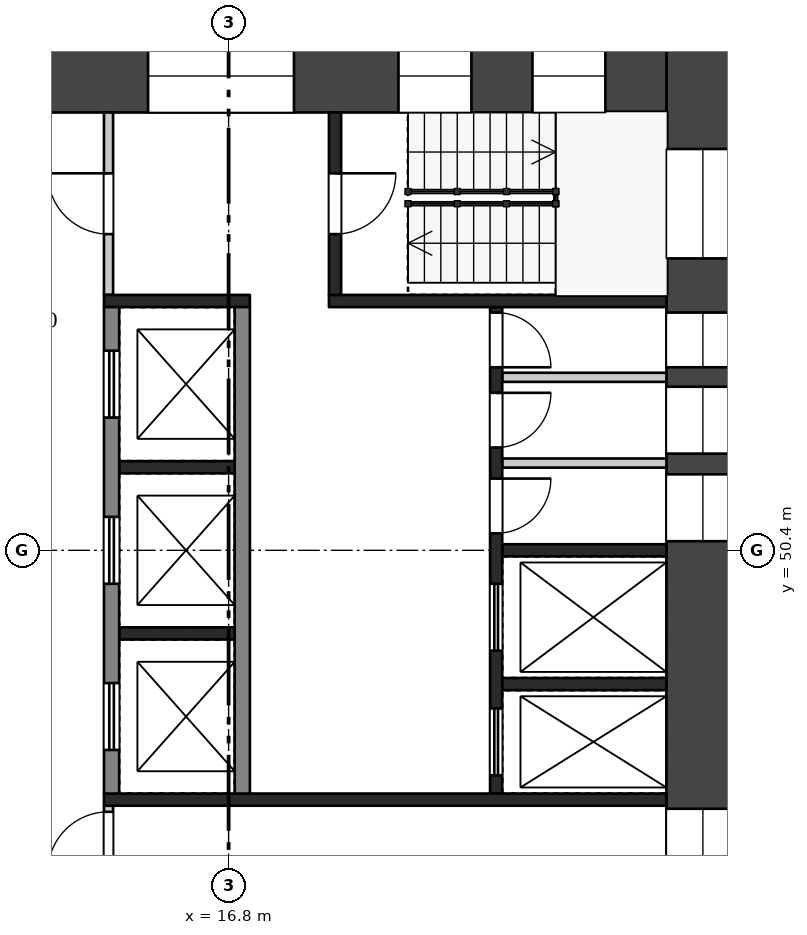
"""IFC4 building model, lengths in metres.
Left out: names, types, materials, properties, quantities, classifications, styles, units other than length and angle.
Written with IfcOpenShell. Run it as: python <this file> out.ifc"""

import sys

from ifc_helpers import new_model, si_unit, direction, frame, frame_2d, origin, place, context, subcontext, project, spatial, rectangle, extrude, element, fill, save


model = new_model("IFC4")
c1 = context("Model", 3, precision=1e-05, world=origin(), true_north=direction((0.0, 1.0)))
c2 = subcontext(c1, "Body", "Model", "MODEL_VIEW")
j1 = project(units=[si_unit("LENGTHUNIT", "METRE"), si_unit("PLANEANGLEUNIT", "RADIAN")], contexts=[c1])
p1 = place(None, origin())
s1 = spatial("IfcSite", under=j1, at=p1, CompositionType="ELEMENT")
p2 = place(p1, origin())
s2 = spatial("IfcBuilding", under=s1, at=p2, CompositionType="ELEMENT")
p3 = place(p2, frame((0.0, 0.0, 158.2)))
s3 = spatial("IfcBuildingStorey", under=s2, at=p3, CompositionType="ELEMENT", Elevation=158.2)
p4 = place(p3, frame((24.6, 58.8, 0.0), z_axis=(0.0, 0.0, 1.0), x_axis=(0.0, -1.0, 0.0)))
e1 = element("IfcWall", 1, at=p4, inside=s3, PredefinedType="SHEAR", context=c2, shape_type="SweptSolid", body=[
    extrude(rectangle(XDim=16.8, YDim=1.2, at=frame_2d((8.4, 0.0))), origin(), (0.0, 0.0, 1.0), 3.22),
])
p5 = place(p4, frame((1.8, 0.0, 0.5)))
e2 = element("IfcOpeningElement", 2, at=p5, cuts=e1, PredefinedType="OPENING", context=c2, shape_type="SweptSolid", body=[
    extrude(rectangle(XDim=1.8, YDim=2.4, at=frame_2d((0.9, 1.2))), frame((0.0, 0.61, 0.0), z_axis=(0.0, -1.0, 0.0), x_axis=(1.0, 0.0, 0.0)), (0.0, 0.0, 1.0), 1.22),
])
p6 = place(p4, frame((4.49, 0.0, 1.6)))
e3 = element("IfcOpeningElement", 3, at=p6, cuts=e1, PredefinedType="OPENING", context=c2, shape_type="SweptSolid", body=[
    extrude(rectangle(XDim=0.9, YDim=1.2, at=frame_2d((0.45, 0.6))), frame((0.0, 0.61, 0.0), z_axis=(0.0, -1.0, 0.0), x_axis=(1.0, 0.0, 0.0)), (0.0, 0.0, 1.0), 1.22),
])
p7 = place(p4, frame((5.71, 0.0, 1.6)))
e4 = element("IfcOpeningElement", 4, at=p7, cuts=e1, PredefinedType="OPENING", context=c2, shape_type="SweptSolid", body=[
    extrude(rectangle(XDim=1.1, YDim=1.2, at=frame_2d((0.55, 0.6))), frame((0.0, 0.61, 0.0), z_axis=(0.0, -1.0, 0.0), x_axis=(1.0, 0.0, 0.0)), (0.0, 0.0, 1.0), 1.22),
])
p8 = place(p4, frame((7.15, 0.0, 1.6)))
e5 = element("IfcOpeningElement", 5, at=p8, cuts=e1, PredefinedType="OPENING", context=c2, shape_type="SweptSolid", body=[
    extrude(rectangle(XDim=1.1, YDim=1.2, at=frame_2d((0.55, 0.6))), frame((0.0, 0.61, 0.0), z_axis=(0.0, -1.0, 0.0), x_axis=(1.0, 0.0, 0.0)), (0.0, 0.0, 1.0), 1.22),
])
p9 = place(p4, frame((12.65, 0.0, 0.6)))
e6 = element("IfcOpeningElement", 6, at=p9, cuts=e1, PredefinedType="OPENING", context=c2, shape_type="SweptSolid", body=[
    extrude(rectangle(XDim=1.0, YDim=2.1, at=frame_2d((0.5, 1.05))), frame((0.0, 0.61, 0.0), z_axis=(0.0, -1.0, 0.0), x_axis=(1.0, 0.0, 0.0)), (0.0, 0.0, 1.0), 1.22),
])
p10 = place(p4, frame((14.175, 0.0, 1.6)))
e7 = element("IfcOpeningElement", 7, at=p10, cuts=e1, PredefinedType="OPENING", context=c2, shape_type="SweptSolid", body=[
    extrude(rectangle(XDim=1.2, YDim=1.2, at=frame_2d((0.6, 0.6))), frame((0.0, 0.61, 0.0), z_axis=(0.0, -1.0, 0.0), x_axis=(1.0, 0.0, 0.0)), (0.0, 0.0, 1.0), 1.22),
])
p11 = place(p3, frame((9.6, 58.2, 0.0), z_axis=(0.0, 0.0, 1.0), x_axis=(1.0, 0.0, 0.0)))
e8 = element("IfcWall", 8, at=p11, inside=s3, PredefinedType="SHEAR", context=c2, shape_type="SweptSolid", body=[
    extrude(rectangle(XDim=14.4, YDim=1.2, at=frame_2d((7.2, 0.0))), origin(), (0.0, 0.0, 1.0), 3.22),
])
p12 = place(p11, frame((1.105, 0.0, 0.6)))
e9 = element("IfcOpeningElement", 9, at=p12, cuts=e8, PredefinedType="OPENING", context=c2, shape_type="SweptSolid", body=[
    extrude(rectangle(XDim=3.0, YDim=2.1, at=frame_2d((1.5, 1.05))), frame((0.0, 0.61, 0.0), z_axis=(0.0, -1.0, 0.0), x_axis=(1.0, 0.0, 0.0)), (0.0, 0.0, 1.0), 1.22),
])
p13 = place(p11, frame((5.875, 0.0, 0.6)))
e10 = element("IfcOpeningElement", 10, at=p13, cuts=e8, PredefinedType="OPENING", context=c2, shape_type="SweptSolid", body=[
    extrude(rectangle(XDim=2.4, YDim=2.1, at=frame_2d((1.2, 1.05))), frame((0.0, 0.61, 0.0), z_axis=(0.0, -1.0, 0.0), x_axis=(1.0, 0.0, 0.0)), (0.0, 0.0, 1.0), 1.22),
])
p14 = place(p11, frame((9.993, 0.0, 0.5)))
e11 = element("IfcOpeningElement", 11, at=p14, cuts=e8, PredefinedType="OPENING", context=c2, shape_type="SweptSolid", body=[
    extrude(rectangle(XDim=1.2, YDim=2.4, at=frame_2d((0.6, 1.2))), frame((0.0, 0.61, 0.0), z_axis=(0.0, -1.0, 0.0), x_axis=(1.0, 0.0, 0.0)), (0.0, 0.0, 1.0), 1.22),
])
p15 = place(p11, frame((12.197, 0.0, 0.5)))
e12 = element("IfcOpeningElement", 12, at=p15, cuts=e8, PredefinedType="OPENING", context=c2, shape_type="SweptSolid", body=[
    extrude(rectangle(XDim=1.2, YDim=2.4, at=frame_2d((0.6, 1.2))), frame((0.0, 0.61, 0.0), z_axis=(0.0, -1.0, 0.0), x_axis=(1.0, 0.0, 0.0)), (0.0, 0.0, 1.0), 1.22),
])
for number, where, z_axis, x_axis in (
    (13, (15.0, 51.767, 0.0), (0.0, 0.0, 1.0), (1.0, 0.0, 0.0)),
    (14, (15.0, 49.033, 0.0), (0.0, 0.0, 1.0), (1.0, 0.0, 0.0)),
):
    element("IfcWall", number, at=place(p3, frame(where, z_axis=z_axis, x_axis=x_axis)), inside=s3, PredefinedType="SHEAR", context=c2, shape_type="SweptSolid", body=[
        extrude(rectangle(XDim=1.9, YDim=0.2, at=frame_2d((0.95, 0.0))), origin(), (0.0, 0.0, 1.0), 3.22),
    ])
p16 = place(p3, frame((14.875, 54.4, 0.0), z_axis=(0.0, 0.0, 1.0), x_axis=(0.0, -1.0, 0.0)))
e15 = element("IfcWall", 15, at=p16, inside=s3, PredefinedType="SHEAR", context=c2, shape_type="SweptSolid", body=[
    extrude(rectangle(XDim=8.0, YDim=0.25, at=frame_2d((4.0, 0.0))), origin(), (0.0, 0.0, 1.0), 3.22),
])
p17 = place(p16, frame((0.717, 0.0, 0.0)))
e16 = element("IfcOpeningElement", 16, at=p17, cuts=e15, PredefinedType="OPENING", context=c2, shape_type="SweptSolid", body=[
    extrude(rectangle(XDim=1.1, YDim=2.1, at=frame_2d((0.55, 1.05))), frame((0.0, 0.135, 0.0), z_axis=(0.0, -1.0, 0.0), x_axis=(1.0, 0.0, 0.0)), (0.0, 0.0, 1.0), 0.27),
])
p18 = place(p16, frame((3.45, 0.0, 0.0)))
e17 = element("IfcOpeningElement", 17, at=p18, cuts=e15, PredefinedType="OPENING", context=c2, shape_type="SweptSolid", body=[
    extrude(rectangle(XDim=1.1, YDim=2.1, at=frame_2d((0.55, 1.05))), frame((0.0, 0.135, 0.0), z_axis=(0.0, -1.0, 0.0), x_axis=(1.0, 0.0, 0.0)), (0.0, 0.0, 1.0), 0.27),
])
p19 = place(p16, frame((6.183, 0.0, 0.0)))
e18 = element("IfcOpeningElement", 18, at=p19, cuts=e15, PredefinedType="OPENING", context=c2, shape_type="SweptSolid", body=[
    extrude(rectangle(XDim=1.1, YDim=2.1, at=frame_2d((0.55, 1.05))), frame((0.0, 0.135, 0.0), z_axis=(0.0, -1.0, 0.0), x_axis=(1.0, 0.0, 0.0)), (0.0, 0.0, 1.0), 0.27),
])
p20 = place(p3, frame((17.025, 54.4, 0.0), z_axis=(0.0, 0.0, 1.0), x_axis=(0.0, -1.0, 0.0)))
e19 = element("IfcWall", 19, at=p20, inside=s3, PredefinedType="SHEAR", context=c2, shape_type="SweptSolid", body=[
    extrude(rectangle(XDim=8.0, YDim=0.25, at=frame_2d((4.0, 0.0))), origin(), (0.0, 0.0, 1.0), 3.22),
])
for number, where, z_axis, x_axis in (
    (20, (21.3, 50.4, 0.0), (0.0, 0.0, 1.0), (1.0, 0.0, 0.0)),
    (21, (21.3, 48.2, 0.0), (0.0, 0.0, 1.0), (1.0, 0.0, 0.0)),
):
    element("IfcWall", number, at=place(p3, frame(where, z_axis=z_axis, x_axis=x_axis)), inside=s3, PredefinedType="SHEAR", context=c2, shape_type="SweptSolid", body=[
        extrude(rectangle(XDim=2.7, YDim=0.2, at=frame_2d((1.35, 0.0))), origin(), (0.0, 0.0, 1.0), 3.22),
    ])
for number, where, z_axis, x_axis in (
    (22, (21.3, 53.245, 0.0), (0.0, 0.0, 1.0), (1.0, 0.0, 0.0)),
    (23, (21.3, 51.835, 0.0), (0.0, 0.0, 1.0), (1.0, 0.0, 0.0)),
):
    element("IfcWall", number, at=place(p3, frame(where, z_axis=z_axis, x_axis=x_axis)), inside=s3, PredefinedType="PARTITIONING", context=c2, shape_type="SweptSolid", body=[
        extrude(rectangle(XDim=2.7, YDim=0.15, at=frame_2d((1.35, 0.0))), origin(), (0.0, 0.0, 1.0), 3.22),
    ])
p21 = place(p3, frame((21.2, 54.4, 0.0), z_axis=(0.0, 0.0, 1.0), x_axis=(0.0, -1.0, 0.0)))
e24 = element("IfcWall", 24, at=p21, inside=s3, PredefinedType="SHEAR", context=c2, shape_type="SweptSolid", body=[
    extrude(rectangle(XDim=8.0, YDim=0.2, at=frame_2d((4.0, 0.0))), origin(), (0.0, 0.0, 1.0), 3.22),
])
p22 = place(p21, frame((0.09, 0.0, 0.0)))
e25 = element("IfcOpeningElement", 25, at=p22, cuts=e24, PredefinedType="OPENING", context=c2, shape_type="SweptSolid", body=[
    extrude(rectangle(XDim=0.9, YDim=2.1, at=frame_2d((0.45, 1.05))), frame((0.0, 0.11, 0.0), z_axis=(0.0, -1.0, 0.0), x_axis=(1.0, 0.0, 0.0)), (0.0, 0.0, 1.0), 0.22),
])
p23 = place(p21, frame((1.41, 0.0, 0.0)))
e26 = element("IfcOpeningElement", 26, at=p23, cuts=e24, PredefinedType="OPENING", context=c2, shape_type="SweptSolid", body=[
    extrude(rectangle(XDim=0.9, YDim=2.1, at=frame_2d((0.45, 1.05))), frame((0.0, 0.11, 0.0), z_axis=(0.0, -1.0, 0.0), x_axis=(1.0, 0.0, 0.0)), (0.0, 0.0, 1.0), 0.22),
])
p24 = place(p21, frame((2.82, 0.0, 0.0)))
e27 = element("IfcOpeningElement", 27, at=p24, cuts=e24, PredefinedType="OPENING", context=c2, shape_type="SweptSolid", body=[
    extrude(rectangle(XDim=0.9, YDim=2.1, at=frame_2d((0.45, 1.05))), frame((0.0, 0.11, 0.0), z_axis=(0.0, -1.0, 0.0), x_axis=(1.0, 0.0, 0.0)), (0.0, 0.0, 1.0), 0.22),
])
p25 = place(p21, frame((4.55, 0.0, 0.0)))
e28 = element("IfcOpeningElement", 28, at=p25, cuts=e24, PredefinedType="OPENING", context=c2, shape_type="SweptSolid", body=[
    extrude(rectangle(XDim=1.1, YDim=2.1, at=frame_2d((0.55, 1.05))), frame((0.0, 0.11, 0.0), z_axis=(0.0, -1.0, 0.0), x_axis=(1.0, 0.0, 0.0)), (0.0, 0.0, 1.0), 0.22),
])
p26 = place(p21, frame((6.6, 0.0, 0.0)))
e29 = element("IfcOpeningElement", 29, at=p26, cuts=e24, PredefinedType="OPENING", context=c2, shape_type="SweptSolid", body=[
    extrude(rectangle(XDim=1.1, YDim=2.1, at=frame_2d((0.55, 1.05))), frame((0.0, 0.11, 0.0), z_axis=(0.0, -1.0, 0.0), x_axis=(1.0, 0.0, 0.0)), (0.0, 0.0, 1.0), 0.22),
])
p27 = place(p3, frame((14.75, 54.5, 0.0), z_axis=(0.0, 0.0, 1.0), x_axis=(1.0, 0.0, 0.0)))
e30 = element("IfcWall", 30, at=p27, inside=s3, PredefinedType="SHEAR", context=c2, shape_type="SweptSolid", body=[
    extrude(rectangle(XDim=2.4, YDim=0.2, at=frame_2d((1.2, 0.0))), origin(), (0.0, 0.0, 1.0), 3.22),
])
p28 = place(p3, frame((18.45, 54.5, 0.0), z_axis=(0.0, 0.0, 1.0), x_axis=(1.0, 0.0, 0.0)))
e31 = element("IfcWall", 31, at=p28, inside=s3, PredefinedType="SHEAR", context=c2, shape_type="SweptSolid", body=[
    extrude(rectangle(XDim=5.55, YDim=0.2, at=frame_2d((2.775, 0.0))), origin(), (0.0, 0.0, 1.0), 3.22),
])
p29 = place(p3, frame((14.825, 57.6, 0.0), z_axis=(0.0, 0.0, 1.0), x_axis=(0.0, -1.0, 0.0)))
e32 = element("IfcWall", 32, at=p29, inside=s3, PredefinedType="PARTITIONING", context=c2, shape_type="SweptSolid", body=[
    extrude(rectangle(XDim=3.0, YDim=0.15, at=frame_2d((1.5, 0.0))), origin(), (0.0, 0.0, 1.0), 3.22),
])
p30 = place(p29, frame((1.0, 0.0, 0.0)))
e33 = element("IfcOpeningElement", 33, at=p30, cuts=e32, PredefinedType="OPENING", context=c2, shape_type="SweptSolid", body=[
    extrude(rectangle(XDim=1.0, YDim=2.1, at=frame_2d((0.5, 1.05))), frame((0.0, 0.085, 0.0), z_axis=(0.0, -1.0, 0.0), x_axis=(1.0, 0.0, 0.0)), (0.0, 0.0, 1.0), 0.17),
])
p31 = place(p3, frame((18.55, 57.6, 0.0), z_axis=(0.0, 0.0, 1.0), x_axis=(0.0, -1.0, 0.0)))
e34 = element("IfcWall", 34, at=p31, inside=s3, PredefinedType="SHEAR", context=c2, shape_type="SweptSolid", body=[
    extrude(rectangle(XDim=3.0, YDim=0.2, at=frame_2d((1.5, 0.0))), origin(), (0.0, 0.0, 1.0), 3.22),
])
p32 = place(p31, frame((1.0, 0.0, 0.0)))
e35 = element("IfcOpeningElement", 35, at=p32, cuts=e34, PredefinedType="OPENING", context=c2, shape_type="SweptSolid", body=[
    extrude(rectangle(XDim=1.0, YDim=2.1, at=frame_2d((0.5, 1.05))), frame((0.0, 0.11, 0.0), z_axis=(0.0, -1.0, 0.0), x_axis=(1.0, 0.0, 0.0)), (0.0, 0.0, 1.0), 0.22),
])
p33 = place(p3, frame((14.75, 46.3, 0.0), z_axis=(0.0, 0.0, 1.0), x_axis=(1.0, 0.0, 0.0)))
e36 = element("IfcWall", 36, at=p33, inside=s3, PredefinedType="SHEAR", context=c2, shape_type="SweptSolid", body=[
    extrude(rectangle(XDim=9.25, YDim=0.2, at=frame_2d((4.625, 0.0))), origin(), (0.0, 0.0, 1.0), 3.22),
])
p34 = place(p3, frame((14.825, 46.2, 0.0), z_axis=(0.0, 0.0, 1.0), x_axis=(0.0, -1.0, 0.0)))
e37 = element("IfcWall", 37, at=p34, inside=s3, PredefinedType="PARTITIONING", context=c2, shape_type="SweptSolid", body=[
    extrude(rectangle(XDim=3.0, YDim=0.15, at=frame_2d((1.5, 0.0))), origin(), (0.0, 0.0, 1.0), 3.22),
])
p35 = place(p34, frame((0.1, 0.0, 0.0)))
e38 = element("IfcOpeningElement", 38, at=p35, cuts=e37, PredefinedType="OPENING", context=c2, shape_type="SweptSolid", body=[
    extrude(rectangle(XDim=1.0, YDim=2.1, at=frame_2d((0.5, 1.05))), frame((0.0, 0.085, 0.0), z_axis=(0.0, -1.0, 0.0), x_axis=(1.0, 0.0, 0.0)), (0.0, 0.0, 1.0), 0.17),
])
p36 = place(p17, origin())
e39 = element("IfcDoor", 39, at=p36, inside=s3, OperationType="DOUBLE_DOOR_SLIDING", PredefinedType="DOOR", context=c2, shape_type="SweptSolid", body=[
    extrude(rectangle(XDim=1.1, YDim=2.1, at=frame_2d((0.55, 1.05))), frame((0.0, 0.025, 0.0), z_axis=(0.0, -1.0, 0.0), x_axis=(1.0, 0.0, 0.0)), (0.0, 0.0, 1.0), 0.05),
])
fill(e16, e39)
p37 = place(p18, origin())
e40 = element("IfcDoor", 40, at=p37, inside=s3, OperationType="DOUBLE_DOOR_SLIDING", PredefinedType="DOOR", context=c2, shape_type="SweptSolid", body=[
    extrude(rectangle(XDim=1.1, YDim=2.1, at=frame_2d((0.55, 1.05))), frame((0.0, 0.025, 0.0), z_axis=(0.0, -1.0, 0.0), x_axis=(1.0, 0.0, 0.0)), (0.0, 0.0, 1.0), 0.05),
])
fill(e17, e40)
p38 = place(p19, origin())
e41 = element("IfcDoor", 41, at=p38, inside=s3, OperationType="DOUBLE_DOOR_SLIDING", PredefinedType="DOOR", context=c2, shape_type="SweptSolid", body=[
    extrude(rectangle(XDim=1.1, YDim=2.1, at=frame_2d((0.55, 1.05))), frame((0.0, 0.025, 0.0), z_axis=(0.0, -1.0, 0.0), x_axis=(1.0, 0.0, 0.0)), (0.0, 0.0, 1.0), 0.05),
])
fill(e18, e41)
p39 = place(p22, origin())
e42 = element("IfcDoor", 42, at=p39, inside=s3, OperationType="SINGLE_SWING_RIGHT", PredefinedType="DOOR", context=c2, shape_type="SweptSolid", body=[
    extrude(rectangle(XDim=0.9, YDim=2.1, at=frame_2d((0.45, 1.05))), frame((0.0, 0.025, 0.0), z_axis=(0.0, -1.0, 0.0), x_axis=(1.0, 0.0, 0.0)), (0.0, 0.0, 1.0), 0.05),
])
fill(e25, e42)
p40 = place(p23, origin())
e43 = element("IfcDoor", 43, at=p40, inside=s3, OperationType="SINGLE_SWING_LEFT", PredefinedType="DOOR", context=c2, shape_type="SweptSolid", body=[
    extrude(rectangle(XDim=0.9, YDim=2.1, at=frame_2d((0.45, 1.05))), frame((0.0, 0.025, 0.0), z_axis=(0.0, -1.0, 0.0), x_axis=(1.0, 0.0, 0.0)), (0.0, 0.0, 1.0), 0.05),
])
fill(e26, e43)
p41 = place(p24, origin())
e44 = element("IfcDoor", 44, at=p41, inside=s3, OperationType="SINGLE_SWING_LEFT", PredefinedType="DOOR", context=c2, shape_type="SweptSolid", body=[
    extrude(rectangle(XDim=0.9, YDim=2.1, at=frame_2d((0.45, 1.05))), frame((0.0, 0.025, 0.0), z_axis=(0.0, -1.0, 0.0), x_axis=(1.0, 0.0, 0.0)), (0.0, 0.0, 1.0), 0.05),
])
fill(e27, e44)
p42 = place(p25, origin())
e45 = element("IfcDoor", 45, at=p42, inside=s3, OperationType="DOUBLE_DOOR_SLIDING", PredefinedType="DOOR", context=c2, shape_type="SweptSolid", body=[
    extrude(rectangle(XDim=1.1, YDim=2.1, at=frame_2d((0.55, 1.05))), frame((0.0, 0.025, 0.0), z_axis=(0.0, -1.0, 0.0), x_axis=(1.0, 0.0, 0.0)), (0.0, 0.0, 1.0), 0.05),
])
fill(e28, e45)
p43 = place(p26, origin())
e46 = element("IfcDoor", 46, at=p43, inside=s3, OperationType="DOUBLE_DOOR_SLIDING", PredefinedType="DOOR", context=c2, shape_type="SweptSolid", body=[
    extrude(rectangle(XDim=1.1, YDim=2.1, at=frame_2d((0.55, 1.05))), frame((0.0, 0.025, 0.0), z_axis=(0.0, -1.0, 0.0), x_axis=(1.0, 0.0, 0.0)), (0.0, 0.0, 1.0), 0.05),
])
fill(e29, e46)
p44 = place(p30, frame((1.0, 0.0, 0.0), z_axis=(0.0, 0.0, 1.0), x_axis=(-1.0, 0.0, 0.0)))
e47 = element("IfcDoor", 47, at=p44, inside=s3, OperationType="SINGLE_SWING_RIGHT", PredefinedType="DOOR", context=c2, shape_type="SweptSolid", body=[
    extrude(rectangle(XDim=1.0, YDim=2.1, at=frame_2d((0.5, 1.05))), frame((0.0, 0.025, 0.0), z_axis=(0.0, -1.0, 0.0), x_axis=(1.0, 0.0, 0.0)), (0.0, 0.0, 1.0), 0.05),
])
fill(e33, e47)
p45 = place(p32, origin())
e48 = element("IfcDoor", 48, at=p45, inside=s3, OperationType="SINGLE_SWING_LEFT", PredefinedType="DOOR", context=c2, shape_type="SweptSolid", body=[
    extrude(rectangle(XDim=1.0, YDim=2.1, at=frame_2d((0.5, 1.05))), frame((0.0, 0.025, 0.0), z_axis=(0.0, -1.0, 0.0), x_axis=(1.0, 0.0, 0.0)), (0.0, 0.0, 1.0), 0.05),
])
fill(e35, e48)
p46 = place(p35, frame((1.0, 0.0, 0.0), z_axis=(0.0, 0.0, 1.0), x_axis=(-1.0, 0.0, 0.0)))
e49 = element("IfcDoor", 49, at=p46, inside=s3, OperationType="SINGLE_SWING_LEFT", PredefinedType="DOOR", context=c2, shape_type="SweptSolid", body=[
    extrude(rectangle(XDim=1.0, YDim=2.1, at=frame_2d((0.5, 1.05))), frame((0.0, 0.025, 0.0), z_axis=(0.0, -1.0, 0.0), x_axis=(1.0, 0.0, 0.0)), (0.0, 0.0, 1.0), 0.05),
])
fill(e38, e49)
p47 = place(p5, origin())
e50 = element("IfcWindow", 50, at=p47, inside=s3, PartitioningType="SINGLE_PANEL", PredefinedType="WINDOW", context=c2, shape_type="SweptSolid", body=[
    extrude(rectangle(XDim=1.8, YDim=2.4, at=frame_2d((0.9, 1.2))), frame((0.0, 0.03, 0.0), z_axis=(0.0, -1.0, 0.0), x_axis=(1.0, 0.0, 0.0)), (0.0, 0.0, 1.0), 0.06),
])
fill(e2, e50)
p48 = place(p6, origin())
e51 = element("IfcWindow", 51, at=p48, inside=s3, PartitioningType="SINGLE_PANEL", PredefinedType="WINDOW", context=c2, shape_type="SweptSolid", body=[
    extrude(rectangle(XDim=0.9, YDim=1.2, at=frame_2d((0.45, 0.6))), frame((0.0, 0.03, 0.0), z_axis=(0.0, -1.0, 0.0), x_axis=(1.0, 0.0, 0.0)), (0.0, 0.0, 1.0), 0.06),
])
fill(e3, e51)
p49 = place(p7, origin())
e52 = element("IfcWindow", 52, at=p49, inside=s3, PartitioningType="SINGLE_PANEL", PredefinedType="WINDOW", context=c2, shape_type="SweptSolid", body=[
    extrude(rectangle(XDim=1.1, YDim=1.2, at=frame_2d((0.55, 0.6))), frame((0.0, 0.03, 0.0), z_axis=(0.0, -1.0, 0.0), x_axis=(1.0, 0.0, 0.0)), (0.0, 0.0, 1.0), 0.06),
])
fill(e4, e52)
p50 = place(p8, origin())
e53 = element("IfcWindow", 53, at=p50, inside=s3, PartitioningType="SINGLE_PANEL", PredefinedType="WINDOW", context=c2, shape_type="SweptSolid", body=[
    extrude(rectangle(XDim=1.1, YDim=1.2, at=frame_2d((0.55, 0.6))), frame((0.0, 0.03, 0.0), z_axis=(0.0, -1.0, 0.0), x_axis=(1.0, 0.0, 0.0)), (0.0, 0.0, 1.0), 0.06),
])
fill(e5, e53)
p51 = place(p9, origin())
e54 = element("IfcWindow", 54, at=p51, inside=s3, PartitioningType="SINGLE_PANEL", PredefinedType="WINDOW", context=c2, shape_type="SweptSolid", body=[
    extrude(rectangle(XDim=1.0, YDim=2.1, at=frame_2d((0.5, 1.05))), frame((0.0, 0.03, 0.0), z_axis=(0.0, -1.0, 0.0), x_axis=(1.0, 0.0, 0.0)), (0.0, 0.0, 1.0), 0.06),
])
fill(e6, e54)
p52 = place(p13, origin())
e55 = element("IfcWindow", 55, at=p52, inside=s3, PartitioningType="SINGLE_PANEL", PredefinedType="WINDOW", context=c2, shape_type="SweptSolid", body=[
    extrude(rectangle(XDim=2.4, YDim=2.1, at=frame_2d((1.2, 1.05))), frame((0.0, 0.03, 0.0), z_axis=(0.0, -1.0, 0.0), x_axis=(1.0, 0.0, 0.0)), (0.0, 0.0, 1.0), 0.06),
])
fill(e10, e55)
p53 = place(p14, origin())
e56 = element("IfcWindow", 56, at=p53, inside=s3, PartitioningType="SINGLE_PANEL", PredefinedType="WINDOW", context=c2, shape_type="SweptSolid", body=[
    extrude(rectangle(XDim=1.2, YDim=2.4, at=frame_2d((0.6, 1.2))), frame((0.0, 0.03, 0.0), z_axis=(0.0, -1.0, 0.0), x_axis=(1.0, 0.0, 0.0)), (0.0, 0.0, 1.0), 0.06),
])
fill(e11, e56)
p54 = place(p15, origin())
e57 = element("IfcWindow", 57, at=p54, inside=s3, PartitioningType="SINGLE_PANEL", PredefinedType="WINDOW", context=c2, shape_type="SweptSolid", body=[
    extrude(rectangle(XDim=1.2, YDim=2.4, at=frame_2d((0.6, 1.2))), frame((0.0, 0.03, 0.0), z_axis=(0.0, -1.0, 0.0), x_axis=(1.0, 0.0, 0.0)), (0.0, 0.0, 1.0), 0.06),
])
fill(e12, e57)
save(model, sys.argv[1])
